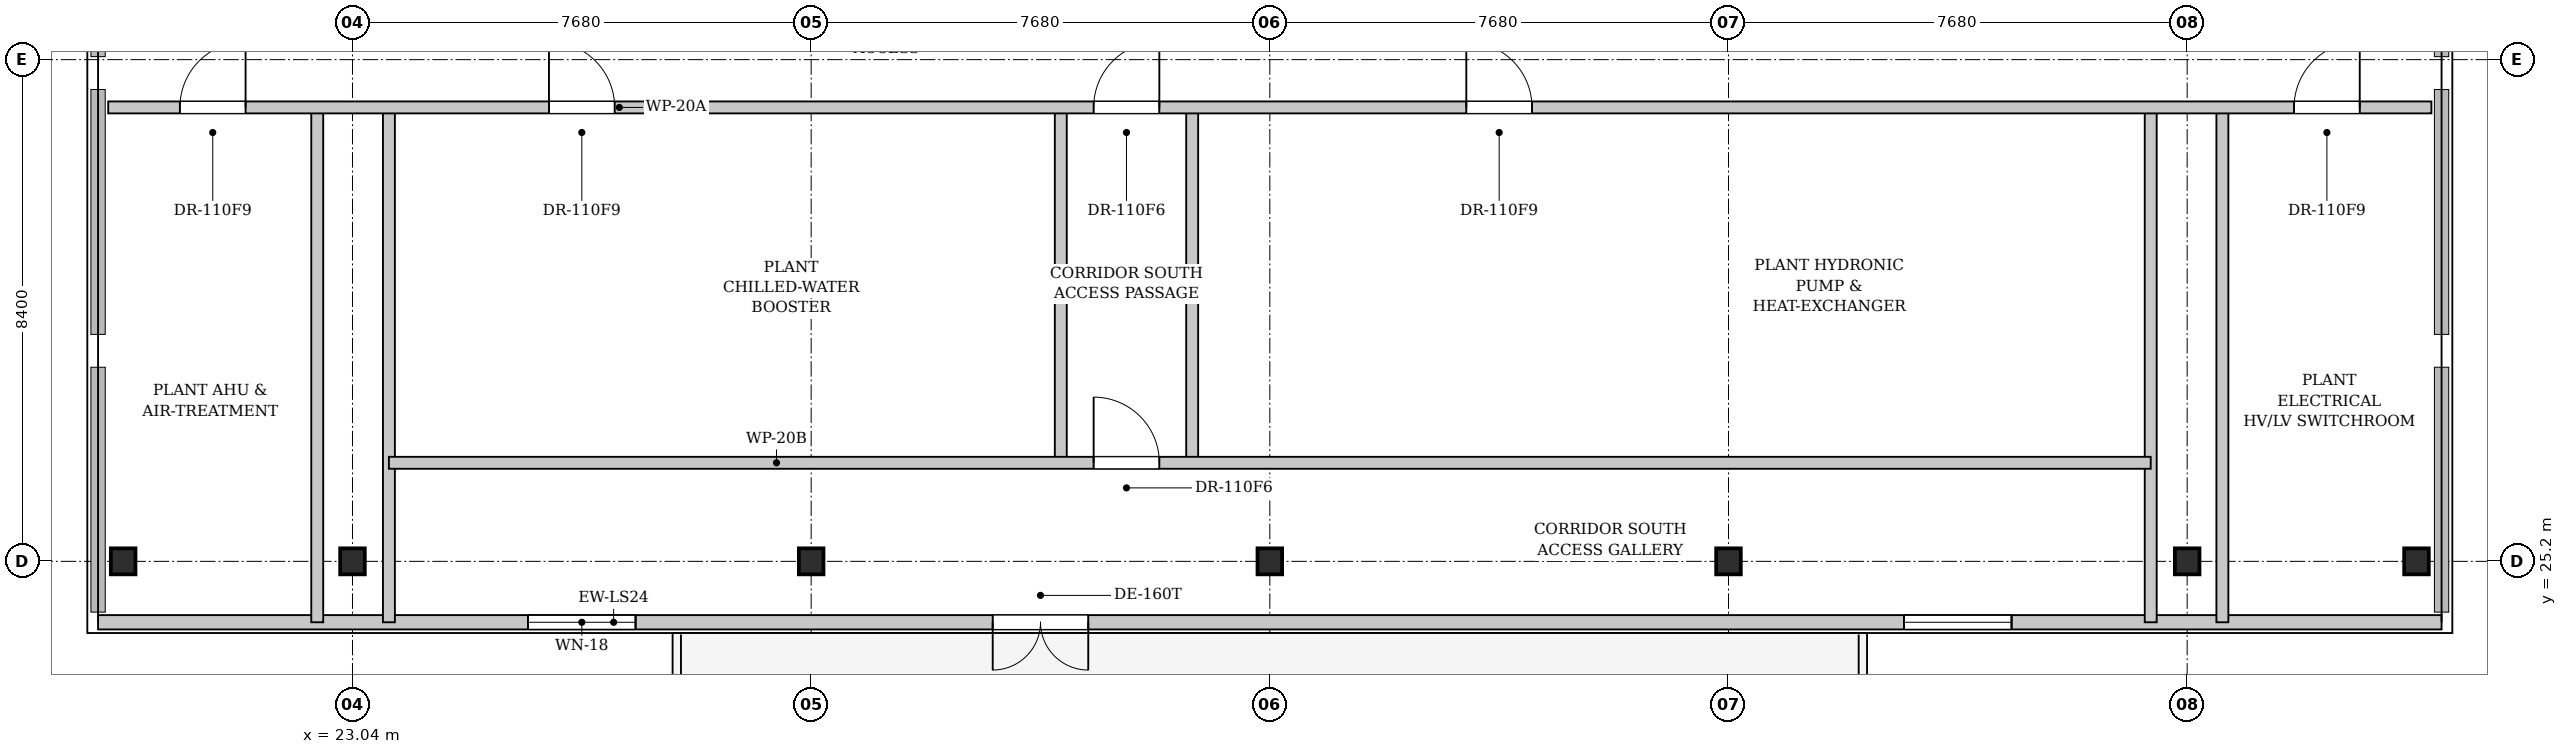
"""IFC4 building model, lengths in metres.
Left out: names, types, materials, properties, quantities, classifications, styles, units other than length and angle.
Written with IfcOpenShell. Run it as: python <this file> out.ifc"""

import sys

from ifc_helpers import new_model, si_unit, direction, frame, frame_2d, origin, origin_2d, place, context, subcontext, project, spatial, rectangle, i_section, extrude, element, fill, save


model = new_model("IFC4")
c1 = context("Model", 3, precision=1e-05, world=origin(), true_north=direction((0.0, 1.0)))
c2 = subcontext(c1, "Body", "Model", "MODEL_VIEW")
j1 = project(units=[si_unit("LENGTHUNIT", "METRE"), si_unit("PLANEANGLEUNIT", "RADIAN")], contexts=[c1])
p1 = place(None, origin())
s1 = spatial("IfcSite", under=j1, at=p1, CompositionType="ELEMENT")
p2 = place(p1, origin())
s2 = spatial("IfcBuilding", under=s1, at=p2, CompositionType="ELEMENT")
p3 = place(p2, frame((0.0, 0.0, 247.4)))
s3 = spatial("IfcBuildingStorey", under=s2, at=p3, CompositionType="ELEMENT", Elevation=247.4)
for number, where, z_axis, x_axis in (
    (1, (23.04, 25.2, 0.0), (0.0, 0.0, 1.0), (1.0, 0.0, 0.0)),
    (2, (30.72, 25.2, 0.0), (0.0, 0.0, 1.0), (1.0, 0.0, 0.0)),
    (3, (38.4, 25.2, 0.0), (0.0, 0.0, 1.0), (1.0, 0.0, 0.0)),
    (4, (46.08, 25.2, 0.0), (0.0, 0.0, 1.0), (1.0, 0.0, 0.0)),
    (5, (53.76, 25.2, 0.0), (0.0, 0.0, 1.0), (1.0, 0.0, 0.0)),
    (6, (19.2, 25.2, 0.0), (0.0, 0.0, 1.0), (1.0, 0.0, 0.0)),
    (7, (57.6, 25.2, 0.0), (0.0, 0.0, 1.0), (1.0, 0.0, 0.0)),
):
    element("IfcColumn", number, at=place(p3, frame(where, z_axis=z_axis, x_axis=x_axis)), inside=s3, PredefinedType="COLUMN", context=c2, shape_type="SweptSolid", body=[
        extrude(i_section(OverallWidth=0.412, OverallDepth=0.435, WebThickness=0.036, FlangeThickness=0.058, FilletRadius=0.015, at=origin_2d()), origin(), (0.0, 0.0, 1.0), 3.9),
    ])
p4 = place(p3, frame((18.78, 24.18, 0.0), z_axis=(0.0, 0.0, 1.0), x_axis=(1.0, 0.0, 0.0)))
e8 = element("IfcWall", 8, at=p4, inside=s3, PredefinedType="SOLIDWALL", context=c2, shape_type="SweptSolid", body=[
    extrude(rectangle(XDim=39.24, YDim=0.24, at=frame_2d((19.62, 0.0))), origin(), (0.0, 0.0, 1.0), 3.68),
])
p5 = place(p4, frame((14.98, 0.0, 0.0)))
e9 = element("IfcOpeningElement", 9, at=p5, cuts=e8, PredefinedType="OPENING", context=c2, shape_type="SweptSolid", body=[
    extrude(rectangle(XDim=1.6, YDim=2.25, at=frame_2d((0.8, 1.125))), frame((0.0, 0.13, 0.0), z_axis=(0.0, -1.0, 0.0), x_axis=(1.0, 0.0, 0.0)), (0.0, 0.0, 1.0), 0.26),
])
p6 = place(p4, frame((7.2, 0.0, 0.9)))
e10 = element("IfcOpeningElement", 10, at=p6, cuts=e8, PredefinedType="OPENING", context=c2, shape_type="SweptSolid", body=[
    extrude(rectangle(XDim=1.8, YDim=2.0, at=frame_2d((0.9, 1.0))), frame((0.0, 0.13, 0.0), z_axis=(0.0, -1.0, 0.0), x_axis=(1.0, 0.0, 0.0)), (0.0, 0.0, 1.0), 0.26),
])
p7 = place(p4, frame((30.24, 0.0, 0.9)))
e11 = element("IfcOpeningElement", 11, at=p7, cuts=e8, PredefinedType="OPENING", context=c2, shape_type="SweptSolid", body=[
    extrude(rectangle(XDim=1.8, YDim=2.0, at=frame_2d((0.9, 1.0))), frame((0.0, 0.13, 0.0), z_axis=(0.0, -1.0, 0.0), x_axis=(1.0, 0.0, 0.0)), (0.0, 0.0, 1.0), 0.26),
])
for number, where, z_axis, x_axis in (
    (12, (22.45, 24.18, 0.0), (0.0, 0.0, 1.0), (0.0, 1.0, 0.0)),
    (13, (23.65, 24.18, 0.0), (0.0, 0.0, 1.0), (0.0, 1.0, 0.0)),
    (14, (53.15, 24.18, 0.0), (0.0, 0.0, 1.0), (0.0, 1.0, 0.0)),
    (15, (54.35, 24.18, 0.0), (0.0, 0.0, 1.0), (0.0, 1.0, 0.0)),
):
    element("IfcWall", number, at=place(p3, frame(where, z_axis=z_axis, x_axis=x_axis)), inside=s3, PredefinedType="PARTITIONING", context=c2, shape_type="SweptSolid", body=[
        extrude(rectangle(XDim=8.62, YDim=0.2, at=frame_2d((4.31, 0.0))), origin(), (0.0, 0.0, 1.0), 3.68),
    ])
for number, where, z_axis, x_axis in (
    (16, (34.9, 26.85, 0.0), (0.0, 0.0, 1.0), (0.0, 1.0, 0.0)),
    (17, (37.1, 26.85, 0.0), (0.0, 0.0, 1.0), (0.0, 1.0, 0.0)),
):
    element("IfcWall", number, at=place(p3, frame(where, z_axis=z_axis, x_axis=x_axis)), inside=s3, PredefinedType="PARTITIONING", context=c2, shape_type="SweptSolid", body=[
        extrude(rectangle(XDim=5.95, YDim=0.2, at=frame_2d((2.975, 0.0))), origin(), (0.0, 0.0, 1.0), 3.68),
    ])
p8 = place(p3, frame((23.65, 26.85, 0.0), z_axis=(0.0, 0.0, 1.0), x_axis=(1.0, 0.0, 0.0)))
e18 = element("IfcWall", 18, at=p8, inside=s3, PredefinedType="PARTITIONING", context=c2, shape_type="SweptSolid", body=[
    extrude(rectangle(XDim=29.5, YDim=0.2, at=frame_2d((14.75, 0.0))), origin(), (0.0, 0.0, 1.0), 3.68),
])
p9 = place(p8, frame((11.8, 0.0, 0.0)))
e19 = element("IfcOpeningElement", 19, at=p9, cuts=e18, PredefinedType="OPENING", context=c2, shape_type="SweptSolid", body=[
    extrude(rectangle(XDim=1.1, YDim=2.15, at=frame_2d((0.55, 1.075))), frame((0.0, 0.11, 0.0), z_axis=(0.0, -1.0, 0.0), x_axis=(1.0, 0.0, 0.0)), (0.0, 0.0, 1.0), 0.22),
])
p10 = place(p3, frame((18.95, 32.8, 0.0), z_axis=(0.0, 0.0, 1.0), x_axis=(1.0, 0.0, 0.0)))
e20 = element("IfcWall", 20, at=p10, inside=s3, PredefinedType="PARTITIONING", context=c2, shape_type="SweptSolid", body=[
    extrude(rectangle(XDim=38.9, YDim=0.2, at=frame_2d((19.45, 0.0))), origin(), (0.0, 0.0, 1.0), 3.68),
])
p11 = place(p10, frame((1.2, 0.0, 0.0)))
e21 = element("IfcOpeningElement", 21, at=p11, cuts=e20, PredefinedType="OPENING", context=c2, shape_type="SweptSolid", body=[
    extrude(rectangle(XDim=1.1, YDim=2.15, at=frame_2d((0.55, 1.075))), frame((0.0, 0.11, 0.0), z_axis=(0.0, -1.0, 0.0), x_axis=(1.0, 0.0, 0.0)), (0.0, 0.0, 1.0), 0.22),
])
p12 = place(p10, frame((7.38, 0.0, 0.0)))
e22 = element("IfcOpeningElement", 22, at=p12, cuts=e20, PredefinedType="OPENING", context=c2, shape_type="SweptSolid", body=[
    extrude(rectangle(XDim=1.1, YDim=2.15, at=frame_2d((0.55, 1.075))), frame((0.0, 0.11, 0.0), z_axis=(0.0, -1.0, 0.0), x_axis=(1.0, 0.0, 0.0)), (0.0, 0.0, 1.0), 0.22),
])
p13 = place(p10, frame((16.5, 0.0, 0.0)))
e23 = element("IfcOpeningElement", 23, at=p13, cuts=e20, PredefinedType="OPENING", context=c2, shape_type="SweptSolid", body=[
    extrude(rectangle(XDim=1.1, YDim=2.15, at=frame_2d((0.55, 1.075))), frame((0.0, 0.11, 0.0), z_axis=(0.0, -1.0, 0.0), x_axis=(1.0, 0.0, 0.0)), (0.0, 0.0, 1.0), 0.22),
])
p14 = place(p10, frame((22.74, 0.0, 0.0)))
e24 = element("IfcOpeningElement", 24, at=p14, cuts=e20, PredefinedType="OPENING", context=c2, shape_type="SweptSolid", body=[
    extrude(rectangle(XDim=1.1, YDim=2.15, at=frame_2d((0.55, 1.075))), frame((0.0, 0.11, 0.0), z_axis=(0.0, -1.0, 0.0), x_axis=(1.0, 0.0, 0.0)), (0.0, 0.0, 1.0), 0.22),
])
p15 = place(p10, frame((36.6, 0.0, 0.0)))
e25 = element("IfcOpeningElement", 25, at=p15, cuts=e20, PredefinedType="OPENING", context=c2, shape_type="SweptSolid", body=[
    extrude(rectangle(XDim=1.1, YDim=2.15, at=frame_2d((0.55, 1.075))), frame((0.0, 0.11, 0.0), z_axis=(0.0, -1.0, 0.0), x_axis=(1.0, 0.0, 0.0)), (0.0, 0.0, 1.0), 0.22),
])
p16 = place(p5, frame((1.6, 0.0, 0.0), z_axis=(0.0, 0.0, 1.0), x_axis=(-1.0, 0.0, 0.0)))
e26 = element("IfcDoor", 26, at=p16, inside=s3, OperationType="SINGLE_SWING_LEFT", PredefinedType="DOOR", context=c2, shape_type="SweptSolid", body=[
    extrude(rectangle(XDim=1.6, YDim=2.25, at=frame_2d((0.8, 1.125))), frame((0.0, 0.025, 0.0), z_axis=(0.0, -1.0, 0.0), x_axis=(1.0, 0.0, 0.0)), (0.0, 0.0, 1.0), 0.05),
])
fill(e9, e26)
p17 = place(p6, origin())
e27 = element("IfcWindow", 27, at=p17, inside=s3, PartitioningType="SINGLE_PANEL", PredefinedType="WINDOW", context=c2, shape_type="SweptSolid", body=[
    extrude(rectangle(XDim=1.8, YDim=2.0, at=frame_2d((0.9, 1.0))), frame((0.0, 0.03, 0.0), z_axis=(0.0, -1.0, 0.0), x_axis=(1.0, 0.0, 0.0)), (0.0, 0.0, 1.0), 0.06),
])
fill(e10, e27)
p18 = place(p7, origin())
e28 = element("IfcWindow", 28, at=p18, inside=s3, PartitioningType="SINGLE_PANEL", PredefinedType="WINDOW", context=c2, shape_type="SweptSolid", body=[
    extrude(rectangle(XDim=1.8, YDim=2.0, at=frame_2d((0.9, 1.0))), frame((0.0, 0.03, 0.0), z_axis=(0.0, -1.0, 0.0), x_axis=(1.0, 0.0, 0.0)), (0.0, 0.0, 1.0), 0.06),
])
fill(e11, e28)
p19 = place(p9, origin())
e29 = element("IfcDoor", 29, at=p19, inside=s3, OperationType="SINGLE_SWING_LEFT", PredefinedType="DOOR", context=c2, shape_type="SweptSolid", body=[
    extrude(rectangle(XDim=1.1, YDim=2.15, at=frame_2d((0.55, 1.075))), frame((0.0, 0.025, 0.0), z_axis=(0.0, -1.0, 0.0), x_axis=(1.0, 0.0, 0.0)), (0.0, 0.0, 1.0), 0.05),
])
fill(e19, e29)
p20 = place(p11, origin())
e30 = element("IfcDoor", 30, at=p20, inside=s3, OperationType="SINGLE_SWING_RIGHT", PredefinedType="DOOR", context=c2, shape_type="SweptSolid", body=[
    extrude(rectangle(XDim=1.1, YDim=2.15, at=frame_2d((0.55, 1.075))), frame((0.0, 0.025, 0.0), z_axis=(0.0, -1.0, 0.0), x_axis=(1.0, 0.0, 0.0)), (0.0, 0.0, 1.0), 0.05),
])
fill(e21, e30)
p21 = place(p12, origin())
e31 = element("IfcDoor", 31, at=p21, inside=s3, OperationType="SINGLE_SWING_LEFT", PredefinedType="DOOR", context=c2, shape_type="SweptSolid", body=[
    extrude(rectangle(XDim=1.1, YDim=2.15, at=frame_2d((0.55, 1.075))), frame((0.0, 0.025, 0.0), z_axis=(0.0, -1.0, 0.0), x_axis=(1.0, 0.0, 0.0)), (0.0, 0.0, 1.0), 0.05),
])
fill(e22, e31)
p22 = place(p13, origin())
e32 = element("IfcDoor", 32, at=p22, inside=s3, OperationType="SINGLE_SWING_RIGHT", PredefinedType="DOOR", context=c2, shape_type="SweptSolid", body=[
    extrude(rectangle(XDim=1.1, YDim=2.15, at=frame_2d((0.55, 1.075))), frame((0.0, 0.025, 0.0), z_axis=(0.0, -1.0, 0.0), x_axis=(1.0, 0.0, 0.0)), (0.0, 0.0, 1.0), 0.05),
])
fill(e23, e32)
p23 = place(p14, origin())
e33 = element("IfcDoor", 33, at=p23, inside=s3, OperationType="SINGLE_SWING_LEFT", PredefinedType="DOOR", context=c2, shape_type="SweptSolid", body=[
    extrude(rectangle(XDim=1.1, YDim=2.15, at=frame_2d((0.55, 1.075))), frame((0.0, 0.025, 0.0), z_axis=(0.0, -1.0, 0.0), x_axis=(1.0, 0.0, 0.0)), (0.0, 0.0, 1.0), 0.05),
])
fill(e24, e33)
p24 = place(p15, origin())
e34 = element("IfcDoor", 34, at=p24, inside=s3, OperationType="SINGLE_SWING_RIGHT", PredefinedType="DOOR", context=c2, shape_type="SweptSolid", body=[
    extrude(rectangle(XDim=1.1, YDim=2.15, at=frame_2d((0.55, 1.075))), frame((0.0, 0.025, 0.0), z_axis=(0.0, -1.0, 0.0), x_axis=(1.0, 0.0, 0.0)), (0.0, 0.0, 1.0), 0.05),
])
fill(e25, e34)
save(model, sys.argv[1])
